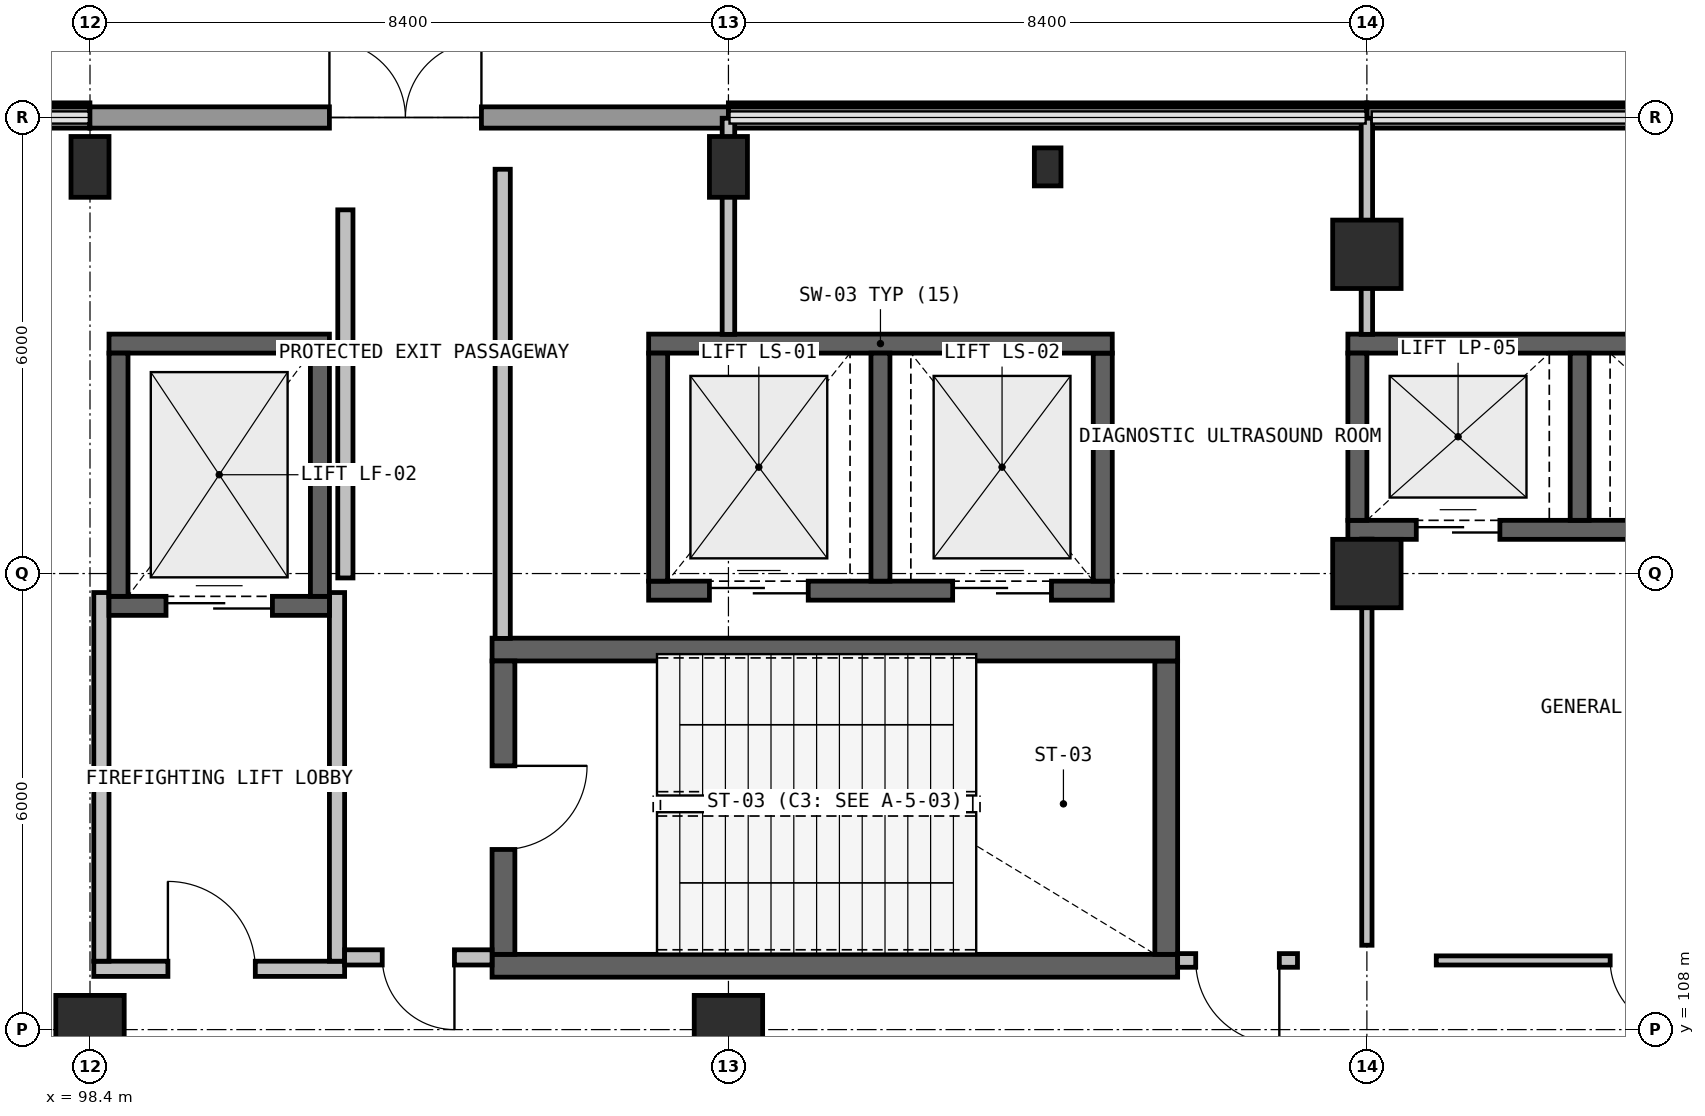
"""IFC4 building model, lengths in metres.
Left out: names, types, materials, properties, quantities, classifications, styles, units other than length and angle.
Written with IfcOpenShell. Run it as: python <this file> out.ifc"""

import sys

from ifc_helpers import new_model, si_unit, direction, frame, frame_2d, origin, origin_2d, place, context, subcontext, project, spatial, rectangle, extrude, element, fill, save


model = new_model("IFC4")
c1 = context("Model", 3, precision=1e-05, world=origin(), true_north=direction((0.0, 1.0)))
c2 = subcontext(c1, "Body", "Model", "MODEL_VIEW")
j1 = project(units=[si_unit("LENGTHUNIT", "METRE"), si_unit("PLANEANGLEUNIT", "RADIAN")], contexts=[c1])
p1 = place(None, origin())
s1 = spatial("IfcSite", under=j1, at=p1, CompositionType="ELEMENT")
p2 = place(p1, origin())
s2 = spatial("IfcBuilding", under=s1, at=p2, CompositionType="ELEMENT")
p3 = place(p2, origin())
s3 = spatial("IfcBuildingStorey", under=s2, at=p3, CompositionType="ELEMENT", Elevation=0.0)
for number, where, z_axis, x_axis in (
    (1, (115.2, 118.2, 0.0), (0.0, 0.0, 1.0), (1.0, 0.0, 0.0)),
    (2, (98.4, 108.0, 0.0), (0.0, 0.0, 1.0), (1.0, 0.0, 0.0)),
):
    element("IfcColumn", number, at=place(p3, frame(where, z_axis=z_axis, x_axis=x_axis)), inside=s3, PredefinedType="COLUMN", context=c2, shape_type="SweptSolid", body=[
        extrude(rectangle(XDim=0.9, YDim=0.9, at=origin_2d()), origin(), (0.0, 0.0, 1.0), 5.4),
    ])
p4 = place(p3, frame((98.4, 119.35, 0.0), z_axis=(0.0, 0.0, 1.0), x_axis=(1.0, 0.0, 0.0)))
e3 = element("IfcColumn", 3, at=p4, inside=s3, PredefinedType="COLUMN", context=c2, shape_type="SweptSolid", body=[
    extrude(rectangle(XDim=0.5, YDim=0.8, at=origin_2d()), origin(), (0.0, 0.0, 1.0), 5.4),
])
p5 = place(p3, frame((106.8, 108.0, 0.0), z_axis=(0.0, 0.0, 1.0), x_axis=(1.0, 0.0, 0.0)))
e4 = element("IfcColumn", 4, at=p5, inside=s3, PredefinedType="COLUMN", context=c2, shape_type="SweptSolid", body=[
    extrude(rectangle(XDim=0.9, YDim=0.9, at=origin_2d()), origin(), (0.0, 0.0, 1.0), 5.4),
])
p6 = place(p3, frame((106.8, 119.35, 0.0), z_axis=(0.0, 0.0, 1.0), x_axis=(1.0, 0.0, 0.0)))
e5 = element("IfcColumn", 5, at=p6, inside=s3, PredefinedType="COLUMN", context=c2, shape_type="SweptSolid", body=[
    extrude(rectangle(XDim=0.5, YDim=0.8, at=origin_2d()), origin(), (0.0, 0.0, 1.0), 5.4),
])
p7 = place(p3, frame((115.2, 114.0, 0.0), z_axis=(0.0, 0.0, 1.0), x_axis=(1.0, 0.0, 0.0)))
e6 = element("IfcColumn", 6, at=p7, inside=s3, PredefinedType="COLUMN", context=c2, shape_type="SweptSolid", body=[
    extrude(rectangle(XDim=0.9, YDim=0.9, at=origin_2d()), origin(), (0.0, 0.0, 1.0), 5.4),
])
p8 = place(p3, frame((111.0, 119.35, 0.0), z_axis=(0.0, 0.0, 1.0), x_axis=(1.0, 0.0, 0.0)))
e7 = element("IfcColumn", 7, at=p8, inside=s3, PredefinedType="PILASTER", context=c2, shape_type="SweptSolid", body=[
    extrude(rectangle(XDim=0.35, YDim=0.5, at=origin_2d()), origin(), (0.0, 0.0, 1.0), 5.4),
])
p9 = place(p3, frame((90.001, 120.0, 0.0), z_axis=(0.0, 0.0, 1.0), x_axis=(1.0, 0.0, 0.0)))
e8 = element("IfcWall", 8, at=p9, inside=s3, PredefinedType="SOLIDWALL", context=c2, shape_type="SweptSolid", body=[
    extrude(rectangle(XDim=8.396, YDim=0.28, at=frame_2d((4.198, 0.0))), origin(), (0.0, 0.0, 1.0), 0.94),
])
p10 = place(p3, frame((98.399, 120.0, 0.0), z_axis=(0.0, 0.0, 1.0), x_axis=(1.0, 0.0, 0.0)))
e9 = element("IfcWall", 9, at=p10, inside=s3, PredefinedType="SOLIDWALL", context=c2, shape_type="SweptSolid", body=[
    extrude(rectangle(XDim=8.4, YDim=0.28, at=frame_2d((4.2, 0.0))), origin(), (0.0, 0.0, 1.0), 5.08),
])
p11 = place(p10, frame((3.151, 0.0, 0.0)))
e10 = element("IfcOpeningElement", 10, at=p11, cuts=e9, PredefinedType="OPENING", context=c2, shape_type="SweptSolid", body=[
    extrude(rectangle(XDim=2.0, YDim=2.3, at=frame_2d((1.0, 1.15))), frame((0.0, 0.15, 0.0), z_axis=(0.0, -1.0, 0.0), x_axis=(1.0, 0.0, 0.0)), (0.0, 0.0, 1.0), 0.3),
])
for number, where, z_axis, x_axis in (
    (11, (106.801, 120.0, 0.0), (0.0, 0.0, 1.0), (1.0, 0.0, 0.0)),
    (12, (115.201, 120.0, 0.0), (0.0, 0.0, 1.0), (1.0, 0.0, 0.0)),
):
    element("IfcWall", number, at=place(p3, frame(where, z_axis=z_axis, x_axis=x_axis)), inside=s3, PredefinedType="SOLIDWALL", context=c2, shape_type="SweptSolid", body=[
        extrude(rectangle(XDim=8.396, YDim=0.28, at=frame_2d((4.198, 0.0))), origin(), (0.0, 0.0, 1.0), 0.94),
    ])
p12 = place(p3, frame((98.45, 108.8, 0.0), z_axis=(0.0, 0.0, 1.0), x_axis=(1.0, 0.0, 0.0)))
e13 = element("IfcWall", 13, at=p12, inside=s3, PredefinedType="SOLIDWALL", context=c2, shape_type="SweptSolid", body=[
    extrude(rectangle(XDim=3.3, YDim=0.2, at=frame_2d((1.65, 0.0))), origin(), (0.0, 0.0, 1.0), 5.08),
])
p13 = place(p12, frame((0.975, 0.0, 0.0)))
e14 = element("IfcOpeningElement", 14, at=p13, cuts=e13, PredefinedType="OPENING", context=c2, shape_type="SweptSolid", body=[
    extrude(rectangle(XDim=1.15, YDim=2.15, at=frame_2d((0.575, 1.075))), frame((0.0, 0.11, 0.0), z_axis=(0.0, -1.0, 0.0), x_axis=(1.0, 0.0, 0.0)), (0.0, 0.0, 1.0), 0.22),
])
p14 = place(p3, frame((101.65, 108.9, 0.0), z_axis=(0.0, 0.0, 1.0), x_axis=(0.0, 1.0, 0.0)))
e15 = element("IfcWall", 15, at=p14, inside=s3, PredefinedType="SOLIDWALL", context=c2, shape_type="SweptSolid", body=[
    extrude(rectangle(XDim=4.85, YDim=0.2, at=frame_2d((2.425, 0.0))), origin(), (0.0, 0.0, 1.0), 5.08),
])
p15 = place(p3, frame((98.55, 113.75, 0.0), z_axis=(0.0, 0.0, 1.0), x_axis=(0.0, -1.0, 0.0)))
e16 = element("IfcWall", 16, at=p15, inside=s3, PredefinedType="SOLIDWALL", context=c2, shape_type="SweptSolid", body=[
    extrude(rectangle(XDim=4.85, YDim=0.2, at=frame_2d((2.425, 0.0))), origin(), (0.0, 0.0, 1.0), 4.33),
])
p16 = place(p3, frame((103.69, 108.84, 0.0), z_axis=(0.0, 0.0, 1.0), x_axis=(1.0, 0.0, 0.0)))
e17 = element("IfcWall", 17, at=p16, inside=s3, PredefinedType="SHEAR", context=c2, shape_type="SweptSolid", body=[
    extrude(rectangle(XDim=9.02, YDim=0.3, at=frame_2d((4.51, 0.0))), origin(), (0.0, 0.0, 1.0), 5.08),
])
p17 = place(p3, frame((112.56, 108.99, 0.0), z_axis=(0.0, 0.0, 1.0), x_axis=(0.0, 1.0, 0.0)))
e18 = element("IfcWall", 18, at=p17, inside=s3, PredefinedType="SHEAR", context=c2, shape_type="SweptSolid", body=[
    extrude(rectangle(XDim=3.86, YDim=0.3, at=frame_2d((1.93, 0.0))), origin(), (0.0, 0.0, 1.0), 5.08),
])
p18 = place(p3, frame((112.71, 113.0, 0.0), z_axis=(0.0, 0.0, 1.0), x_axis=(-1.0, 0.0, 0.0)))
e19 = element("IfcWall", 19, at=p18, inside=s3, PredefinedType="SHEAR", context=c2, shape_type="SweptSolid", body=[
    extrude(rectangle(XDim=9.02, YDim=0.3, at=frame_2d((4.51, 0.0))), origin(), (0.0, 0.0, 1.0), 5.08),
])
p19 = place(p3, frame((103.84, 112.85, 0.0), z_axis=(0.0, 0.0, 1.0), x_axis=(0.0, -1.0, 0.0)))
e20 = element("IfcWall", 20, at=p19, inside=s3, PredefinedType="SHEAR", context=c2, shape_type="SweptSolid", body=[
    extrude(rectangle(XDim=3.86, YDim=0.3, at=frame_2d((1.93, 0.0))), origin(), (0.0, 0.0, 1.0), 5.08),
])
p20 = place(p19, frame((1.38, 0.0, 0.0)))
e21 = element("IfcOpeningElement", 21, at=p20, cuts=e20, PredefinedType="OPENING", context=c2, shape_type="SweptSolid", body=[
    extrude(rectangle(XDim=1.1, YDim=2.15, at=frame_2d((0.55, 1.075))), frame((0.0, 0.16, 0.0), z_axis=(0.0, -1.0, 0.0), x_axis=(1.0, 0.0, 0.0)), (0.0, 0.0, 1.0), 0.32),
])
p21 = place(p3, frame((98.65, 113.575, 0.0), z_axis=(0.0, 0.0, 1.0), x_axis=(1.0, 0.0, 0.0)))
e22 = element("IfcWall", 22, at=p21, inside=s3, PredefinedType="SHEAR", context=c2, shape_type="SweptSolid", body=[
    extrude(rectangle(XDim=2.9, YDim=0.25, at=frame_2d((1.45, 0.0))), origin(), (0.0, 0.0, 1.0), 5.08),
])
p22 = place(p21, frame((0.75, 0.0, 0.0)))
e23 = element("IfcOpeningElement", 23, at=p22, cuts=e22, PredefinedType="OPENING", context=c2, shape_type="SweptSolid", body=[
    extrude(rectangle(XDim=1.4, YDim=2.15, at=frame_2d((0.7, 1.075))), frame((0.0, 0.135, 0.0), z_axis=(0.0, -1.0, 0.0), x_axis=(1.0, 0.0, 0.0)), (0.0, 0.0, 1.0), 0.27),
])
p23 = place(p3, frame((101.425, 113.7, 0.0), z_axis=(0.0, 0.0, 1.0), x_axis=(0.0, 1.0, 0.0)))
e24 = element("IfcWall", 24, at=p23, inside=s3, PredefinedType="SHEAR", context=c2, shape_type="SweptSolid", body=[
    extrude(rectangle(XDim=3.2, YDim=0.25, at=frame_2d((1.6, 0.0))), origin(), (0.0, 0.0, 1.0), 5.08),
])
p24 = place(p3, frame((101.55, 117.025, 0.0), z_axis=(0.0, 0.0, 1.0), x_axis=(-1.0, 0.0, 0.0)))
e25 = element("IfcWall", 25, at=p24, inside=s3, PredefinedType="SHEAR", context=c2, shape_type="SweptSolid", body=[
    extrude(rectangle(XDim=2.9, YDim=0.25, at=frame_2d((1.45, 0.0))), origin(), (0.0, 0.0, 1.0), 5.08),
])
p25 = place(p3, frame((98.775, 116.9, 0.0), z_axis=(0.0, 0.0, 1.0), x_axis=(0.0, -1.0, 0.0)))
e26 = element("IfcWall", 26, at=p25, inside=s3, PredefinedType="SHEAR", context=c2, shape_type="SweptSolid", body=[
    extrude(rectangle(XDim=3.2, YDim=0.25, at=frame_2d((1.6, 0.0))), origin(), (0.0, 0.0, 1.0), 5.08),
])
p26 = place(p3, frame((105.75, 113.775, 0.0), z_axis=(0.0, 0.0, 1.0), x_axis=(1.0, 0.0, 0.0)))
e27 = element("IfcWall", 27, at=p26, inside=s3, PredefinedType="SHEAR", context=c2, shape_type="SweptSolid", body=[
    extrude(rectangle(XDim=6.1, YDim=0.25, at=frame_2d((3.05, 0.0))), origin(), (0.0, 0.0, 1.0), 5.08),
])
p27 = place(p26, frame((0.8, 0.0, 0.0)))
e28 = element("IfcOpeningElement", 28, at=p27, cuts=e27, PredefinedType="OPENING", context=c2, shape_type="SweptSolid", body=[
    extrude(rectangle(XDim=1.3, YDim=2.15, at=frame_2d((0.65, 1.075))), frame((0.0, 0.135, 0.0), z_axis=(0.0, -1.0, 0.0), x_axis=(1.0, 0.0, 0.0)), (0.0, 0.0, 1.0), 0.27),
])
p28 = place(p26, frame((4.0, 0.0, 0.0)))
e29 = element("IfcOpeningElement", 29, at=p28, cuts=e27, PredefinedType="OPENING", context=c2, shape_type="SweptSolid", body=[
    extrude(rectangle(XDim=1.3, YDim=2.15, at=frame_2d((0.65, 1.075))), frame((0.0, 0.135, 0.0), z_axis=(0.0, -1.0, 0.0), x_axis=(1.0, 0.0, 0.0)), (0.0, 0.0, 1.0), 0.27),
])
p29 = place(p3, frame((111.725, 113.9, 0.0), z_axis=(0.0, 0.0, 1.0), x_axis=(0.0, 1.0, 0.0)))
e30 = element("IfcWall", 30, at=p29, inside=s3, PredefinedType="SHEAR", context=c2, shape_type="SweptSolid", body=[
    extrude(rectangle(XDim=3.0, YDim=0.25, at=frame_2d((1.5, 0.0))), origin(), (0.0, 0.0, 1.0), 5.08),
])
p30 = place(p3, frame((111.85, 117.025, 0.0), z_axis=(0.0, 0.0, 1.0), x_axis=(-1.0, 0.0, 0.0)))
e31 = element("IfcWall", 31, at=p30, inside=s3, PredefinedType="SHEAR", context=c2, shape_type="SweptSolid", body=[
    extrude(rectangle(XDim=6.1, YDim=0.25, at=frame_2d((3.05, 0.0))), origin(), (0.0, 0.0, 1.0), 5.08),
])
for number, where, z_axis, x_axis in (
    (32, (105.875, 116.9, 0.0), (0.0, 0.0, 1.0), (0.0, -1.0, 0.0)),
    (33, (108.8, 113.9, 0.0), (0.0, 0.0, 1.0), (0.0, 1.0, 0.0)),
):
    element("IfcWall", number, at=place(p3, frame(where, z_axis=z_axis, x_axis=x_axis)), inside=s3, PredefinedType="SHEAR", context=c2, shape_type="SweptSolid", body=[
        extrude(rectangle(XDim=3.0, YDim=0.25, at=frame_2d((1.5, 0.0))), origin(), (0.0, 0.0, 1.0), 5.08),
    ])
p31 = place(p3, frame((114.95, 114.575, 0.0), z_axis=(0.0, 0.0, 1.0), x_axis=(1.0, 0.0, 0.0)))
e34 = element("IfcWall", 34, at=p31, inside=s3, PredefinedType="SHEAR", context=c2, shape_type="SweptSolid", body=[
    extrude(rectangle(XDim=6.1, YDim=0.25, at=frame_2d((3.05, 0.0))), origin(), (0.0, 0.0, 1.0), 5.08),
])
p32 = place(p31, frame((0.9, 0.0, 0.0)))
e35 = element("IfcOpeningElement", 35, at=p32, cuts=e34, PredefinedType="OPENING", context=c2, shape_type="SweptSolid", body=[
    extrude(rectangle(XDim=1.1, YDim=2.15, at=frame_2d((0.55, 1.075))), frame((0.0, 0.135, 0.0), z_axis=(0.0, -1.0, 0.0), x_axis=(1.0, 0.0, 0.0)), (0.0, 0.0, 1.0), 0.27),
])
p33 = place(p31, frame((4.1, 0.0, 0.0)))
e36 = element("IfcOpeningElement", 36, at=p33, cuts=e34, PredefinedType="OPENING", context=c2, shape_type="SweptSolid", body=[
    extrude(rectangle(XDim=1.1, YDim=2.15, at=frame_2d((0.55, 1.075))), frame((0.0, 0.135, 0.0), z_axis=(0.0, -1.0, 0.0), x_axis=(1.0, 0.0, 0.0)), (0.0, 0.0, 1.0), 0.27),
])
p34 = place(p3, frame((121.05, 117.025, 0.0), z_axis=(0.0, 0.0, 1.0), x_axis=(-1.0, 0.0, 0.0)))
e37 = element("IfcWall", 37, at=p34, inside=s3, PredefinedType="SHEAR", context=c2, shape_type="SweptSolid", body=[
    extrude(rectangle(XDim=6.1, YDim=0.25, at=frame_2d((3.05, 0.0))), origin(), (0.0, 0.0, 1.0), 5.08),
])
for number, where, z_axis, x_axis in (
    (38, (115.075, 116.9, 0.0), (0.0, 0.0, 1.0), (0.0, -1.0, 0.0)),
    (39, (118.0, 114.7, 0.0), (0.0, 0.0, 1.0), (0.0, 1.0, 0.0)),
):
    element("IfcWall", number, at=place(p3, frame(where, z_axis=z_axis, x_axis=x_axis)), inside=s3, PredefinedType="SHEAR", context=c2, shape_type="SweptSolid", body=[
        extrude(rectangle(XDim=2.2, YDim=0.25, at=frame_2d((1.1, 0.0))), origin(), (0.0, 0.0, 1.0), 5.08),
    ])
p35 = place(p3, frame((103.83, 119.319, 0.0), z_axis=(0.0, 0.0, 1.0), x_axis=(0.0, -1.0, 0.0)))
e40 = element("IfcWall", 40, at=p35, inside=s3, PredefinedType="SOLIDWALL", context=c2, shape_type="SweptSolid", body=[
    extrude(rectangle(XDim=6.172, YDim=0.2, at=frame_2d((3.086, 0.0))), origin(), (0.0, 0.0, 1.0), 5.08),
])
p36 = place(p3, frame((103.69, 108.95, 0.0), z_axis=(0.0, 0.0, 1.0), x_axis=(-1.0, 0.0, 0.0)))
e41 = element("IfcWall", 41, at=p36, inside=s3, PredefinedType="SOLIDWALL", context=c2, shape_type="SweptSolid", body=[
    extrude(rectangle(XDim=1.94, YDim=0.2, at=frame_2d((0.97, 0.0))), origin(), (0.0, 0.0, 1.0), 5.08),
])
p37 = place(p36, frame((0.495, 0.0, 0.0)))
e42 = element("IfcOpeningElement", 42, at=p37, cuts=e41, PredefinedType="OPENING", context=c2, shape_type="SweptSolid", body=[
    extrude(rectangle(XDim=0.95, YDim=2.1, at=frame_2d((0.475, 1.05))), frame((0.0, 0.11, 0.0), z_axis=(0.0, -1.0, 0.0), x_axis=(1.0, 0.0, 0.0)), (0.0, 0.0, 1.0), 0.22),
])
p38 = place(p3, frame((101.76, 113.942, 0.0), z_axis=(0.0, 0.0, 1.0), x_axis=(0.0, 1.0, 0.0)))
e43 = element("IfcWall", 43, at=p38, inside=s3, PredefinedType="SOLIDWALL", context=c2, shape_type="SweptSolid", body=[
    extrude(rectangle(XDim=4.843, YDim=0.2, at=frame_2d((2.421, 0.0))), origin(), (0.0, 0.0, 1.0), 5.08),
])
p39 = place(p3, frame((114.287, 108.91, 0.0), z_axis=(0.0, 0.0, 1.0), x_axis=(-1.0, 0.0, 0.0)))
e44 = element("IfcWall", 44, at=p39, inside=s3, PredefinedType="PARTITIONING", context=c2, shape_type="SweptSolid", body=[
    extrude(rectangle(XDim=1.577, YDim=0.18, at=frame_2d((0.789, 0.0))), origin(), (0.0, 0.0, 1.0), 5.08),
])
p40 = place(p39, frame((0.239, 0.0, 0.0)))
e45 = element("IfcOpeningElement", 45, at=p40, cuts=e44, PredefinedType="OPENING", context=c2, shape_type="SweptSolid", body=[
    extrude(rectangle(XDim=1.1, YDim=2.15, at=frame_2d((0.55, 1.075))), frame((0.0, 0.1, 0.0), z_axis=(0.0, -1.0, 0.0), x_axis=(1.0, 0.0, 0.0)), (0.0, 0.0, 1.0), 0.2),
])
p41 = place(p3, frame((106.8, 117.147, 0.0), z_axis=(0.0, 0.0, 1.0), x_axis=(0.0, 1.0, 0.0)))
e46 = element("IfcWall", 46, at=p41, inside=s3, PredefinedType="PARTITIONING", context=c2, shape_type="SweptSolid", body=[
    extrude(rectangle(XDim=2.843, YDim=0.165, at=frame_2d((1.421, 0.0))), origin(), (0.0, 0.0, 1.0), 5.08),
])
p42 = place(p3, frame((115.2, 119.99, 0.0), z_axis=(0.0, 0.0, 1.0), x_axis=(0.0, -1.0, 0.0)))
e47 = element("IfcWall", 47, at=p42, inside=s3, PredefinedType="PARTITIONING", context=c2, shape_type="SweptSolid", body=[
    extrude(rectangle(XDim=2.843, YDim=0.15, at=frame_2d((1.421, 0.0))), origin(), (0.0, 0.0, 1.0), 5.08),
])
p43 = place(p3, frame((115.2, 114.453, 0.0), z_axis=(0.0, 0.0, 1.0), x_axis=(0.0, -1.0, 0.0)))
e48 = element("IfcWall", 48, at=p43, inside=s3, PredefinedType="PARTITIONING", context=c2, shape_type="SweptSolid", body=[
    extrude(rectangle(XDim=5.343, YDim=0.135, at=frame_2d((2.671, 0.0))), origin(), (0.0, 0.0, 1.0), 4.33),
])
p44 = place(p3, frame((121.589, 108.91, 0.0), z_axis=(0.0, 0.0, 1.0), x_axis=(-1.0, 0.0, 0.0)))
e49 = element("IfcWall", 49, at=p44, inside=s3, PredefinedType="PARTITIONING", context=c2, shape_type="SweptSolid", body=[
    extrude(rectangle(XDim=5.476, YDim=0.12, at=frame_2d((2.738, 0.0))), origin(), (0.0, 0.0, 1.0), 5.08),
])
p45 = place(p44, frame((2.288, 0.0, 0.0)))
e50 = element("IfcOpeningElement", 50, at=p45, cuts=e49, PredefinedType="OPENING", context=c2, shape_type="SweptSolid", body=[
    extrude(rectangle(XDim=0.9, YDim=2.1, at=frame_2d((0.45, 1.05))), frame((0.0, 0.07, 0.0), z_axis=(0.0, -1.0, 0.0), x_axis=(1.0, 0.0, 0.0)), (0.0, 0.0, 1.0), 0.14),
])
p46 = place(p11, origin())
e51 = element("IfcDoor", 51, at=p46, inside=s3, OperationType="DOUBLE_DOOR_SINGLE_SWING", PredefinedType="DOOR", context=c2, shape_type="SweptSolid", body=[
    extrude(rectangle(XDim=2.0, YDim=2.3, at=frame_2d((1.0, 1.15))), frame((0.0, 0.025, 0.0), z_axis=(0.0, -1.0, 0.0), x_axis=(1.0, 0.0, 0.0)), (0.0, 0.0, 1.0), 0.05),
])
fill(e10, e51)
p47 = place(p13, origin())
e52 = element("IfcDoor", 52, at=p47, inside=s3, OperationType="SINGLE_SWING_RIGHT", PredefinedType="DOOR", context=c2, shape_type="SweptSolid", body=[
    extrude(rectangle(XDim=1.15, YDim=2.15, at=frame_2d((0.575, 1.075))), frame((0.0, 0.025, 0.0), z_axis=(0.0, -1.0, 0.0), x_axis=(1.0, 0.0, 0.0)), (0.0, 0.0, 1.0), 0.05),
])
fill(e14, e52)
p48 = place(p20, origin())
e53 = element("IfcDoor", 53, at=p48, inside=s3, OperationType="SINGLE_SWING_RIGHT", PredefinedType="DOOR", context=c2, shape_type="SweptSolid", body=[
    extrude(rectangle(XDim=1.1, YDim=2.15, at=frame_2d((0.55, 1.075))), frame((0.0, 0.025, 0.0), z_axis=(0.0, -1.0, 0.0), x_axis=(1.0, 0.0, 0.0)), (0.0, 0.0, 1.0), 0.05),
])
fill(e21, e53)
p49 = place(p22, origin())
e54 = element("IfcDoor", 54, at=p49, inside=s3, OperationType="DOUBLE_DOOR_SLIDING", PredefinedType="DOOR", context=c2, shape_type="SweptSolid", body=[
    extrude(rectangle(XDim=1.4, YDim=2.15, at=frame_2d((0.7, 1.075))), frame((0.0, 0.025, 0.0), z_axis=(0.0, -1.0, 0.0), x_axis=(1.0, 0.0, 0.0)), (0.0, 0.0, 1.0), 0.05),
])
fill(e23, e54)
p50 = place(p27, origin())
e55 = element("IfcDoor", 55, at=p50, inside=s3, OperationType="DOUBLE_DOOR_SLIDING", PredefinedType="DOOR", context=c2, shape_type="SweptSolid", body=[
    extrude(rectangle(XDim=1.3, YDim=2.15, at=frame_2d((0.65, 1.075))), frame((0.0, 0.025, 0.0), z_axis=(0.0, -1.0, 0.0), x_axis=(1.0, 0.0, 0.0)), (0.0, 0.0, 1.0), 0.05),
])
fill(e28, e55)
p51 = place(p28, origin())
e56 = element("IfcDoor", 56, at=p51, inside=s3, OperationType="DOUBLE_DOOR_SLIDING", PredefinedType="DOOR", context=c2, shape_type="SweptSolid", body=[
    extrude(rectangle(XDim=1.3, YDim=2.15, at=frame_2d((0.65, 1.075))), frame((0.0, 0.025, 0.0), z_axis=(0.0, -1.0, 0.0), x_axis=(1.0, 0.0, 0.0)), (0.0, 0.0, 1.0), 0.05),
])
fill(e29, e56)
p52 = place(p32, origin())
e57 = element("IfcDoor", 57, at=p52, inside=s3, OperationType="DOUBLE_DOOR_SLIDING", PredefinedType="DOOR", context=c2, shape_type="SweptSolid", body=[
    extrude(rectangle(XDim=1.1, YDim=2.15, at=frame_2d((0.55, 1.075))), frame((0.0, 0.025, 0.0), z_axis=(0.0, -1.0, 0.0), x_axis=(1.0, 0.0, 0.0)), (0.0, 0.0, 1.0), 0.05),
])
fill(e35, e57)
p53 = place(p37, origin())
e58 = element("IfcDoor", 58, at=p53, inside=s3, OperationType="SINGLE_SWING_LEFT", PredefinedType="DOOR", context=c2, shape_type="SweptSolid", body=[
    extrude(rectangle(XDim=0.95, YDim=2.1, at=frame_2d((0.475, 1.05))), frame((0.0, 0.025, 0.0), z_axis=(0.0, -1.0, 0.0), x_axis=(1.0, 0.0, 0.0)), (0.0, 0.0, 1.0), 0.05),
])
fill(e42, e58)
p54 = place(p40, origin())
e59 = element("IfcDoor", 59, at=p54, inside=s3, OperationType="SINGLE_SWING_LEFT", PredefinedType="DOOR", context=c2, shape_type="SweptSolid", body=[
    extrude(rectangle(XDim=1.1, YDim=2.15, at=frame_2d((0.55, 1.075))), frame((0.0, 0.025, 0.0), z_axis=(0.0, -1.0, 0.0), x_axis=(1.0, 0.0, 0.0)), (0.0, 0.0, 1.0), 0.05),
])
fill(e45, e59)
p55 = place(p45, origin())
e60 = element("IfcDoor", 60, at=p55, inside=s3, OperationType="SINGLE_SWING_RIGHT", PredefinedType="DOOR", context=c2, shape_type="SweptSolid", body=[
    extrude(rectangle(XDim=0.9, YDim=2.1, at=frame_2d((0.45, 1.05))), frame((0.0, 0.025, 0.0), z_axis=(0.0, -1.0, 0.0), x_axis=(1.0, 0.0, 0.0)), (0.0, 0.0, 1.0), 0.05),
])
fill(e50, e60)
save(model, sys.argv[1])
